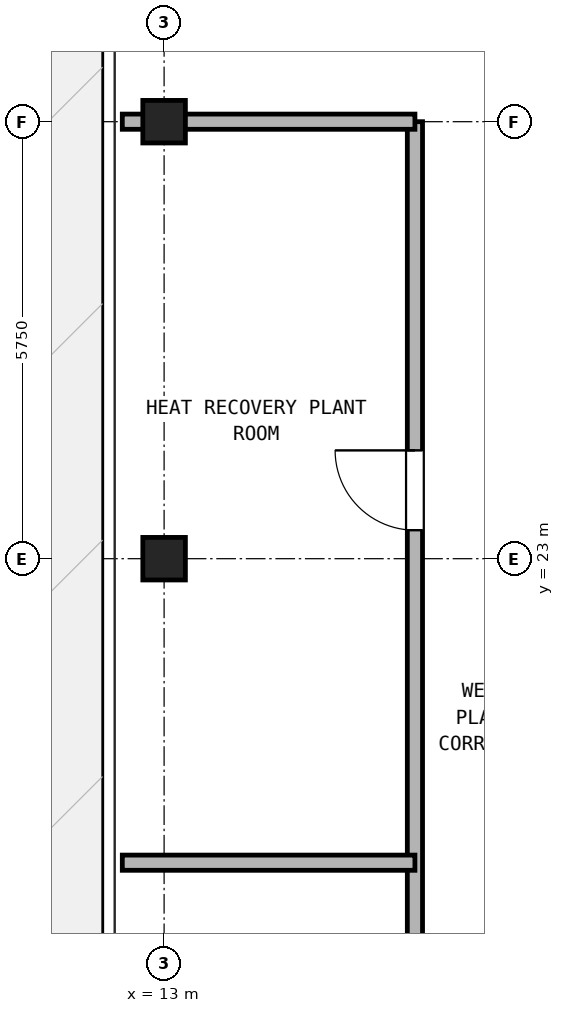
"""IFC4 building model, lengths in metres.
Left out: names, types, materials, properties, quantities, classifications, styles, units other than length and angle.
Written with IfcOpenShell. Run it as: python <this file> out.ifc"""

import sys

from ifc_helpers import new_model, si_unit, direction, frame, frame_2d, origin, origin_2d, place, context, subcontext, project, spatial, rectangle, hollow_rectangle, extrude, source, transform, mapped, element, fill, save


model = new_model("IFC4")
c1 = context("Model", 3, precision=1e-05, world=origin(), true_north=direction((0.0, 1.0)))
c2 = subcontext(c1, "Body", "Model", "MODEL_VIEW")
j1 = project(units=[si_unit("LENGTHUNIT", "METRE"), si_unit("PLANEANGLEUNIT", "RADIAN")], contexts=[c1])
p1 = place(None, origin())
s1 = spatial("IfcSite", under=j1, at=p1, CompositionType="ELEMENT")
p2 = place(p1, origin())
s2 = spatial("IfcBuilding", under=s1, at=p2, CompositionType="ELEMENT")
p3 = place(p2, frame((0.0, 0.0, 278.5)))
s3 = spatial("IfcBuildingStorey", under=s2, at=p3, CompositionType="ELEMENT", Elevation=278.5)
m1 = source(origin(), c2, "Body", "SweptSolid", [
    extrude(hollow_rectangle(XDim=0.56, YDim=0.56, WallThickness=0.03, at=origin_2d()), origin(), (0.0, 0.0, 1.0), 3.38),
])
for number, where, z_axis, x_axis in (
    (1, (13.0, 23.0, 0.0), (0.0, 0.0, 1.0), (1.0, 0.0, 0.0)),
    (2, (13.0, 28.75, 0.0), (0.0, 0.0, 1.0), (1.0, 0.0, 0.0)),
):
    element("IfcColumn", number, at=place(p3, frame(where, z_axis=z_axis, x_axis=x_axis)), inside=s3, PredefinedType="COLUMN", context=c2, shape_type="MappedRepresentation", body=[
        mapped(m1, transform((0.0, 0.0, 0.0), x_axis=(1.0, 0.0, 0.0), y_axis=(0.0, 1.0, 0.0), z_axis=(0.0, 0.0, 1.0), scale=1.0)),
    ])
p4 = place(p3, frame((16.3, 8.9, 0.0), z_axis=(0.0, 0.0, 1.0), x_axis=(0.0, 1.0, 0.0)))
e3 = element("IfcWall", 3, at=p4, inside=s3, PredefinedType="PARTITIONING", context=c2, shape_type="SweptSolid", body=[
    extrude(rectangle(XDim=19.85, YDim=0.2, at=frame_2d((9.925, 0.0))), origin(), (0.0, 0.0, 1.0), 3.38),
])
p5 = place(p4, frame((4.55, 0.0, 0.0)))
e4 = element("IfcOpeningElement", 4, at=p5, cuts=e3, PredefinedType="OPENING", context=c2, shape_type="SweptSolid", body=[
    extrude(rectangle(XDim=1.05, YDim=2.15, at=frame_2d((0.525, 1.075))), frame((0.0, 0.11, 0.0), z_axis=(0.0, -1.0, 0.0), x_axis=(1.0, 0.0, 0.0)), (0.0, 0.0, 1.0), 0.22),
])
p6 = place(p4, frame((14.475, 0.0, 0.0)))
e5 = element("IfcOpeningElement", 5, at=p6, cuts=e3, PredefinedType="OPENING", context=c2, shape_type="SweptSolid", body=[
    extrude(rectangle(XDim=1.05, YDim=2.15, at=frame_2d((0.525, 1.075))), frame((0.0, 0.11, 0.0), z_axis=(0.0, -1.0, 0.0), x_axis=(1.0, 0.0, 0.0)), (0.0, 0.0, 1.0), 0.22),
])
p7 = place(p3, frame((12.45, 28.75, 0.0), z_axis=(0.0, 0.0, 1.0), x_axis=(1.0, 0.0, 0.0)))
e6 = element("IfcWall", 6, at=p7, inside=s3, PredefinedType="PARTITIONING", context=c2, shape_type="SweptSolid", body=[
    extrude(rectangle(XDim=3.85, YDim=0.2, at=frame_2d((1.925, 0.0))), origin(), (0.0, 0.0, 1.0), 2.905),
])
p8 = place(p3, frame((12.45, 19.0, 0.0), z_axis=(0.0, 0.0, 1.0), x_axis=(1.0, 0.0, 0.0)))
e7 = element("IfcWall", 7, at=p8, inside=s3, PredefinedType="PARTITIONING", context=c2, shape_type="SweptSolid", body=[
    extrude(rectangle(XDim=3.85, YDim=0.2, at=frame_2d((1.925, 0.0))), origin(), (0.0, 0.0, 1.0), 3.38),
])
p9 = place(p6, frame((1.05, 0.0, 0.0), z_axis=(0.0, 0.0, 1.0), x_axis=(-1.0, 0.0, 0.0)))
e8 = element("IfcDoor", 8, at=p9, inside=s3, OperationType="SINGLE_SWING_RIGHT", PredefinedType="DOOR", context=c2, shape_type="SweptSolid", body=[
    extrude(rectangle(XDim=1.05, YDim=2.15, at=frame_2d((0.525, 1.075))), frame((0.0, 0.025, 0.0), z_axis=(0.0, -1.0, 0.0), x_axis=(1.0, 0.0, 0.0)), (0.0, 0.0, 1.0), 0.05),
])
fill(e5, e8)
save(model, sys.argv[1])
